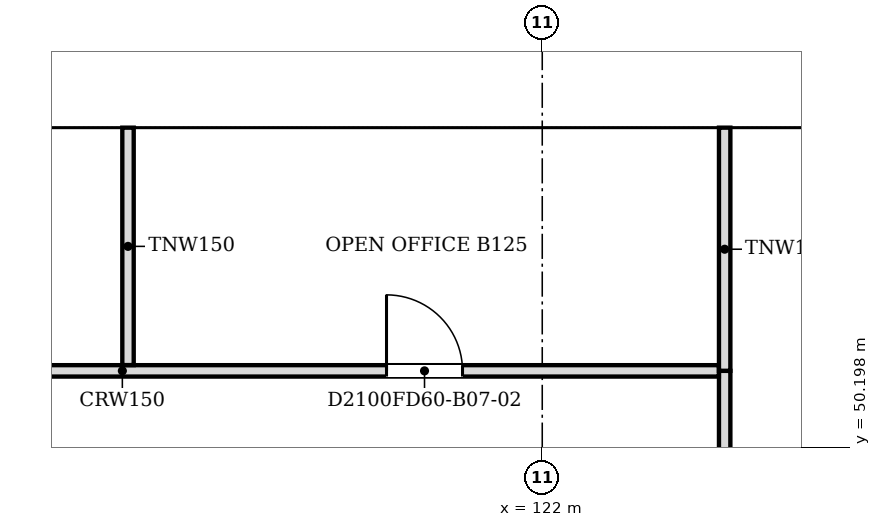
"""IFC4 building model, lengths in metres.
Left out: names, types, materials, properties, quantities, classifications, styles, units other than length and angle.
Written with IfcOpenShell. Run it as: python <this file> out.ifc"""

import sys

from ifc_helpers import new_model, si_unit, direction, frame, frame_2d, origin, place, context, subcontext, project, spatial, polyline, rectangle, outline, extrude, faceted_brep, source, transform, mapped, element, fill, save


model = new_model("IFC4")
c1 = context("Model", 3, precision=1e-05, world=origin(), true_north=direction((0.0, 1.0)))
c2 = subcontext(c1, "Body", "Model", "MODEL_VIEW")
j1 = project(units=[si_unit("LENGTHUNIT", "METRE"), si_unit("PLANEANGLEUNIT", "RADIAN")], contexts=[c1])
p1 = place(None, origin())
s1 = spatial("IfcSite", under=j1, at=p1, CompositionType="ELEMENT")
p2 = place(p1, origin())
s2 = spatial("IfcBuilding", under=s1, at=p2, CompositionType="ELEMENT")
p3 = place(p2, frame((0.0, 0.0, 72.4)))
s3 = spatial("IfcBuildingStorey", under=s2, at=p3, CompositionType="ELEMENT", Elevation=72.4)
m1 = source(origin(), c2, "Body", "Brep", [
    faceted_brep([(3.003, -0.25, 0.0), (6.053, -0.25, 3.8), (3.003, -0.25, 7.6), (0.0, -0.25, 3.8), (0.047, 0.25, 3.859), (3.003, 0.25, 7.6), (6.053, 0.25, 3.8), (3.003, 0.25, 0.0), (0.047, 0.25, 3.741), (0.0, 0.0, 3.8)], [[[0, 1, 2, 3]], [[4, 5, 6, 7, 8]], [[7, 6, 1, 0]], [[6, 5, 2, 1]], [[5, 4, 9, 3, 2]], [[8, 7, 0, 3, 9]], [[8, 9, 4]]]),
])
p4 = place(p3, frame((128.053, 54.65, -3.8), z_axis=(0.0, 0.0, 1.0), x_axis=(-1.0, 0.0, 0.0)))
e1 = element("IfcWall", 1, at=p4, inside=s3, PredefinedType="SOLIDWALL", context=c2, shape_type="MappedRepresentation", body=[
    mapped(m1, transform((0.0, 0.0, 0.0), scale=1.0)),
])
m2 = source(origin(), c2, "Body", "SweptSolid", [
    extrude(outline(polyline([(3.005, 0.401), (5.733, 3.8), (3.005, 7.199), (0.319, 3.8), (3.005, 0.401)])), frame((0.0, 0.26, 0.0), z_axis=(0.0, -1.0, 0.0), x_axis=(1.0, 0.0, 0.0)), (0.0, 0.0, 1.0), 0.52),
])
p5 = place(p4, origin())
e2 = element("IfcOpeningElement", 2, at=p5, cuts=e1, PredefinedType="OPENING", context=c2, shape_type="MappedRepresentation", body=[
    mapped(m2, transform((0.0, 0.0, 0.0), scale=1.0)),
])
m3 = source(origin(), c2, "Body", "SweptSolid", [
    extrude(outline(polyline([(3.05, 0.0), (6.1, 3.8), (3.05, 7.6), (0.0, 3.8), (3.05, 0.0)])), frame((0.0, 0.25, 0.0), z_axis=(0.0, -1.0, 0.0), x_axis=(1.0, 0.0, 0.0)), (0.0, 0.0, 1.0), 0.5),
])
p6 = place(p3, frame((122.0, 54.65, -3.8), z_axis=(0.0, 0.0, 1.0), x_axis=(-1.0, 0.0, 0.0)))
e3 = element("IfcWall", 3, at=p6, inside=s3, PredefinedType="SOLIDWALL", context=c2, shape_type="MappedRepresentation", body=[
    mapped(m3, transform((0.0, 0.0, 0.0), scale=1.0)),
])
m4 = source(origin(), c2, "Body", "SweptSolid", [
    extrude(outline(polyline([(3.05, 0.399), (5.78, 3.8), (3.05, 7.2), (0.321, 3.8), (3.05, 0.399)])), frame((0.0, 0.26, 0.0), z_axis=(0.0, -1.0, 0.0), x_axis=(1.0, 0.0, 0.0)), (0.0, 0.0, 1.0), 0.52),
])
p7 = place(p6, origin())
e4 = element("IfcOpeningElement", 4, at=p7, cuts=e3, PredefinedType="OPENING", context=c2, shape_type="MappedRepresentation", body=[
    mapped(m4, transform((0.0, 0.0, 0.0), scale=1.0)),
])
m5 = source(origin(), c2, "Body", "Brep", [
    faceted_brep([(3.05, -0.25, 0.0), (6.1, -0.25, 3.8), (6.1, -0.25, 3.8), (3.05, -0.25, 7.6), (0.0, -0.25, 3.8), (0.0, 0.25, 3.8), (3.05, 0.25, 7.6), (6.1, 0.25, 3.8), (6.1, 0.25, 3.8), (3.05, 0.25, 0.0)], [[[0, 1, 2, 3, 4]], [[5, 6, 7, 8, 9]], [[9, 8, 1, 0]], [[7, 6, 3, 2]], [[6, 5, 4, 3]], [[5, 9, 0, 4]], [[1, 8, 7, 2]]]),
])
p8 = place(p3, frame((115.9, 54.65, -3.8), z_axis=(0.0, 0.0, 1.0), x_axis=(-1.0, 0.0, 0.0)))
e5 = element("IfcWall", 5, at=p8, inside=s3, PredefinedType="SOLIDWALL", context=c2, shape_type="MappedRepresentation", body=[
    mapped(m5, transform((0.0, 0.0, 0.0), scale=1.0)),
])
p9 = place(p8, origin())
e6 = element("IfcOpeningElement", 6, at=p9, cuts=e5, PredefinedType="OPENING", context=c2, shape_type="MappedRepresentation", body=[
    mapped(m4, transform((0.0, 0.0, 0.0), scale=1.0)),
])
p10 = place(p2, frame((0.0, 0.0, 76.2)))
s4 = spatial("IfcBuildingStorey", under=s2, at=p10, CompositionType="ELEMENT", Elevation=76.2)
m6 = source(origin(), c2, "Body", "Brep", [
    faceted_brep([(0.047, -0.25, 0.0), (3.05, -0.25, 3.8), (0.047, -0.25, 7.6), (0.0, -0.25, 7.54), (0.0, -0.25, 0.06), (0.093, 0.25, 7.541), (3.05, 0.25, 3.8), (0.093, 0.25, 0.059), (0.047, 0.0, 0.0), (0.047, 0.0, 7.6)], [[[0, 1, 2, 3, 4]], [[5, 6, 7]], [[7, 6, 1, 0, 8]], [[6, 5, 9, 2, 1]], [[3, 2, 9]], [[8, 0, 4]], [[7, 8, 4, 3, 9, 5]]]),
])
p11 = place(p10, frame((128.1, 54.65, -3.8), z_axis=(0.0, 0.0, 1.0), x_axis=(-1.0, 0.0, 0.0)))
e7 = element("IfcWall", 7, at=p11, inside=s4, PredefinedType="SOLIDWALL", context=c2, shape_type="MappedRepresentation", body=[
    mapped(m6, transform((0.0, 0.0, 0.0), scale=1.0)),
])
m7 = source(origin(), c2, "Body", "SweptSolid", [
    extrude(outline(polyline([(0.247, 0.656), (2.731, 3.8), (0.247, 6.944), (0.247, 0.656)])), frame((0.0, 0.26, 0.0), z_axis=(0.0, -1.0, 0.0), x_axis=(1.0, 0.0, 0.0)), (0.0, 0.0, 1.0), 0.52),
])
p12 = place(p11, origin())
e8 = element("IfcOpeningElement", 8, at=p12, cuts=e7, PredefinedType="OPENING", context=c2, shape_type="MappedRepresentation", body=[
    mapped(m7, transform((0.0, 0.0, 0.0), scale=1.0)),
])
m8 = source(origin(), c2, "Body", "SweptSolid", [
    extrude(outline(polyline([(3.05, 0.0), (6.1, 3.8), (3.05, 7.6), (0.0, 3.8), (3.05, 0.0)])), frame((0.0, 0.25, 0.0), z_axis=(0.0, -1.0, 0.0), x_axis=(1.0, 0.0, 0.0)), (0.0, 0.0, 1.0), 0.5),
])
p13 = place(p10, frame((125.05, 54.65, -3.8), z_axis=(0.0, 0.0, 1.0), x_axis=(-1.0, 0.0, 0.0)))
e9 = element("IfcWall", 9, at=p13, inside=s4, PredefinedType="SOLIDWALL", context=c2, shape_type="MappedRepresentation", body=[
    mapped(m8, transform((0.0, 0.0, 0.0), scale=1.0)),
])
m9 = source(origin(), c2, "Body", "SweptSolid", [
    extrude(outline(polyline([(3.05, 0.399), (5.78, 3.8), (3.05, 7.201), (0.321, 3.8), (3.05, 0.399)])), frame((0.0, 0.26, 0.0), z_axis=(0.0, -1.0, 0.0), x_axis=(1.0, 0.0, 0.0)), (0.0, 0.0, 1.0), 0.52),
])
p14 = place(p13, origin())
e10 = element("IfcOpeningElement", 10, at=p14, cuts=e9, PredefinedType="OPENING", context=c2, shape_type="MappedRepresentation", body=[
    mapped(m9, transform((0.0, 0.0, 0.0), scale=1.0)),
])
m10 = source(origin(), c2, "Body", "Brep", [
    faceted_brep([(3.05, -0.25, 0.0), (6.1, -0.25, 3.8), (6.1, -0.25, 3.8), (3.05, -0.25, 7.6), (0.0, -0.25, 3.8), (0.0, 0.25, 3.8), (3.05, 0.25, 7.6), (6.1, 0.25, 3.8), (6.1, 0.25, 3.8), (3.05, 0.25, 0.0)], [[[0, 1, 2, 3, 4]], [[5, 6, 7, 8, 9]], [[9, 8, 1, 0]], [[7, 6, 3, 2]], [[6, 5, 4, 3]], [[5, 9, 0, 4]], [[1, 8, 7, 2]]]),
])
p15 = place(p10, frame((118.95, 54.65, -3.8), z_axis=(0.0, 0.0, 1.0), x_axis=(-1.0, 0.0, 0.0)))
e11 = element("IfcWall", 11, at=p15, inside=s4, PredefinedType="SOLIDWALL", context=c2, shape_type="MappedRepresentation", body=[
    mapped(m10, transform((0.0, 0.0, 0.0), scale=1.0)),
])
p16 = place(p15, origin())
e12 = element("IfcOpeningElement", 12, at=p16, cuts=e11, PredefinedType="OPENING", context=c2, shape_type="MappedRepresentation", body=[
    mapped(m9, transform((0.0, 0.0, 0.0), scale=1.0)),
])
p17 = place(p3, frame((124.4, 51.2, 0.0), z_axis=(0.0, 0.0, 1.0), x_axis=(0.0, -1.0, 0.0)))
e13 = element("IfcWall", 13, at=p17, inside=s3, PredefinedType="PARTITIONING", context=c2, shape_type="SweptSolid", body=[
    extrude(rectangle(XDim=14.6, YDim=0.15, at=frame_2d((7.3, 0.0))), origin(), (0.0, 0.0, 1.0), 3.067),
])
m11 = source(origin(), c2, "Body", "SweptSolid", [
    extrude(rectangle(XDim=0.9, YDim=2.1, at=frame_2d((0.45, 1.05))), frame((0.0, 0.085, 0.0), z_axis=(0.0, -1.0, 0.0), x_axis=(1.0, 0.0, 0.0)), (0.0, 0.0, 1.0), 0.17),
])
p18 = place(p17, frame((3.9, 0.0, 0.0)))
e14 = element("IfcOpeningElement", 14, at=p18, cuts=e13, PredefinedType="OPENING", context=c2, shape_type="MappedRepresentation", body=[
    mapped(m11, transform((0.0, 0.0, 0.0), scale=1.0)),
])
m12 = source(origin(), c2, "Body", "SweptSolid", [
    extrude(rectangle(XDim=1.8, YDim=2.1, at=frame_2d((0.9, 1.05))), frame((0.0, 0.085, 0.0), z_axis=(0.0, -1.0, 0.0), x_axis=(1.0, 0.0, 0.0)), (0.0, 0.0, 1.0), 0.17),
])
p19 = place(p17, frame((10.7, 0.0, 0.0)))
e15 = element("IfcOpeningElement", 15, at=p19, cuts=e13, PredefinedType="OPENING", context=c2, shape_type="MappedRepresentation", body=[
    mapped(m12, transform((0.0, 0.0, 0.0), scale=1.0)),
])
p20 = place(p3, frame((108.5, 51.2, 0.0), z_axis=(0.0, 0.0, 1.0), x_axis=(1.0, 0.0, 0.0)))
e16 = element("IfcWall", 16, at=p20, inside=s3, PredefinedType="PARTITIONING", context=c2, shape_type="SweptSolid", body=[
    extrude(rectangle(XDim=15.824, YDim=0.15, at=frame_2d((7.912, 0.0))), origin(), (0.0, 0.0, 1.0), 3.067),
])
m13 = source(origin(), c2, "Body", "SweptSolid", [
    extrude(rectangle(XDim=1.0, YDim=2.1, at=frame_2d((0.5, 1.05))), frame((0.0, 0.085, 0.0), z_axis=(0.0, -1.0, 0.0), x_axis=(1.0, 0.0, 0.0)), (0.0, 0.0, 1.0), 0.17),
])
p21 = place(p20, frame((11.451, 0.0, 0.0)))
e17 = element("IfcOpeningElement", 17, at=p21, cuts=e16, PredefinedType="OPENING", context=c2, shape_type="MappedRepresentation", body=[
    mapped(m13, transform((0.0, 0.0, 0.0), scale=1.0)),
])
p22 = place(p20, frame((3.5, 0.0, 0.0)))
e18 = element("IfcOpeningElement", 18, at=p22, cuts=e16, PredefinedType="OPENING", context=c2, shape_type="MappedRepresentation", body=[
    mapped(m13, transform((0.0, 0.0, 0.0), scale=1.0)),
])
p23 = place(p3, frame((124.4, 51.201, 0.0), z_axis=(0.0, 0.0, 1.0), x_axis=(0.0, 1.0, 0.0)))
e19 = element("IfcWall", 19, at=p23, inside=s3, PredefinedType="PARTITIONING", context=c2, shape_type="SweptSolid", body=[
    extrude(rectangle(XDim=3.199, YDim=0.15, at=frame_2d((1.6, 0.0))), origin(), (0.0, 0.0, 1.0), 3.067),
])
p24 = place(p3, frame((116.55, 51.276, 0.0), z_axis=(0.0, 0.0, 1.0), x_axis=(0.0, 1.0, 0.0)))
e20 = element("IfcWall", 20, at=p24, inside=s3, PredefinedType="PARTITIONING", context=c2, shape_type="SweptSolid", body=[
    extrude(rectangle(XDim=3.124, YDim=0.15, at=frame_2d((1.562, 0.0))), origin(), (0.0, 0.0, 1.0), 3.067),
])
m14 = source(origin(), c2, "Body", "SweptSolid", [
    extrude(rectangle(XDim=1.0, YDim=2.1, at=frame_2d((0.5, 1.05))), frame((0.0, 0.025, 0.0), z_axis=(0.0, -1.0, 0.0), x_axis=(1.0, 0.0, 0.0)), (0.0, 0.0, 1.0), 0.05),
])
p25 = place(p21, origin())
e21 = element("IfcDoor", 21, at=p25, inside=s3, OperationType="SINGLE_SWING_LEFT", PredefinedType="DOOR", context=c2, shape_type="MappedRepresentation", body=[
    mapped(m14, transform((0.0, 0.0, 0.0), scale=1.0)),
])
fill(e17, e21)
save(model, sys.argv[1])
